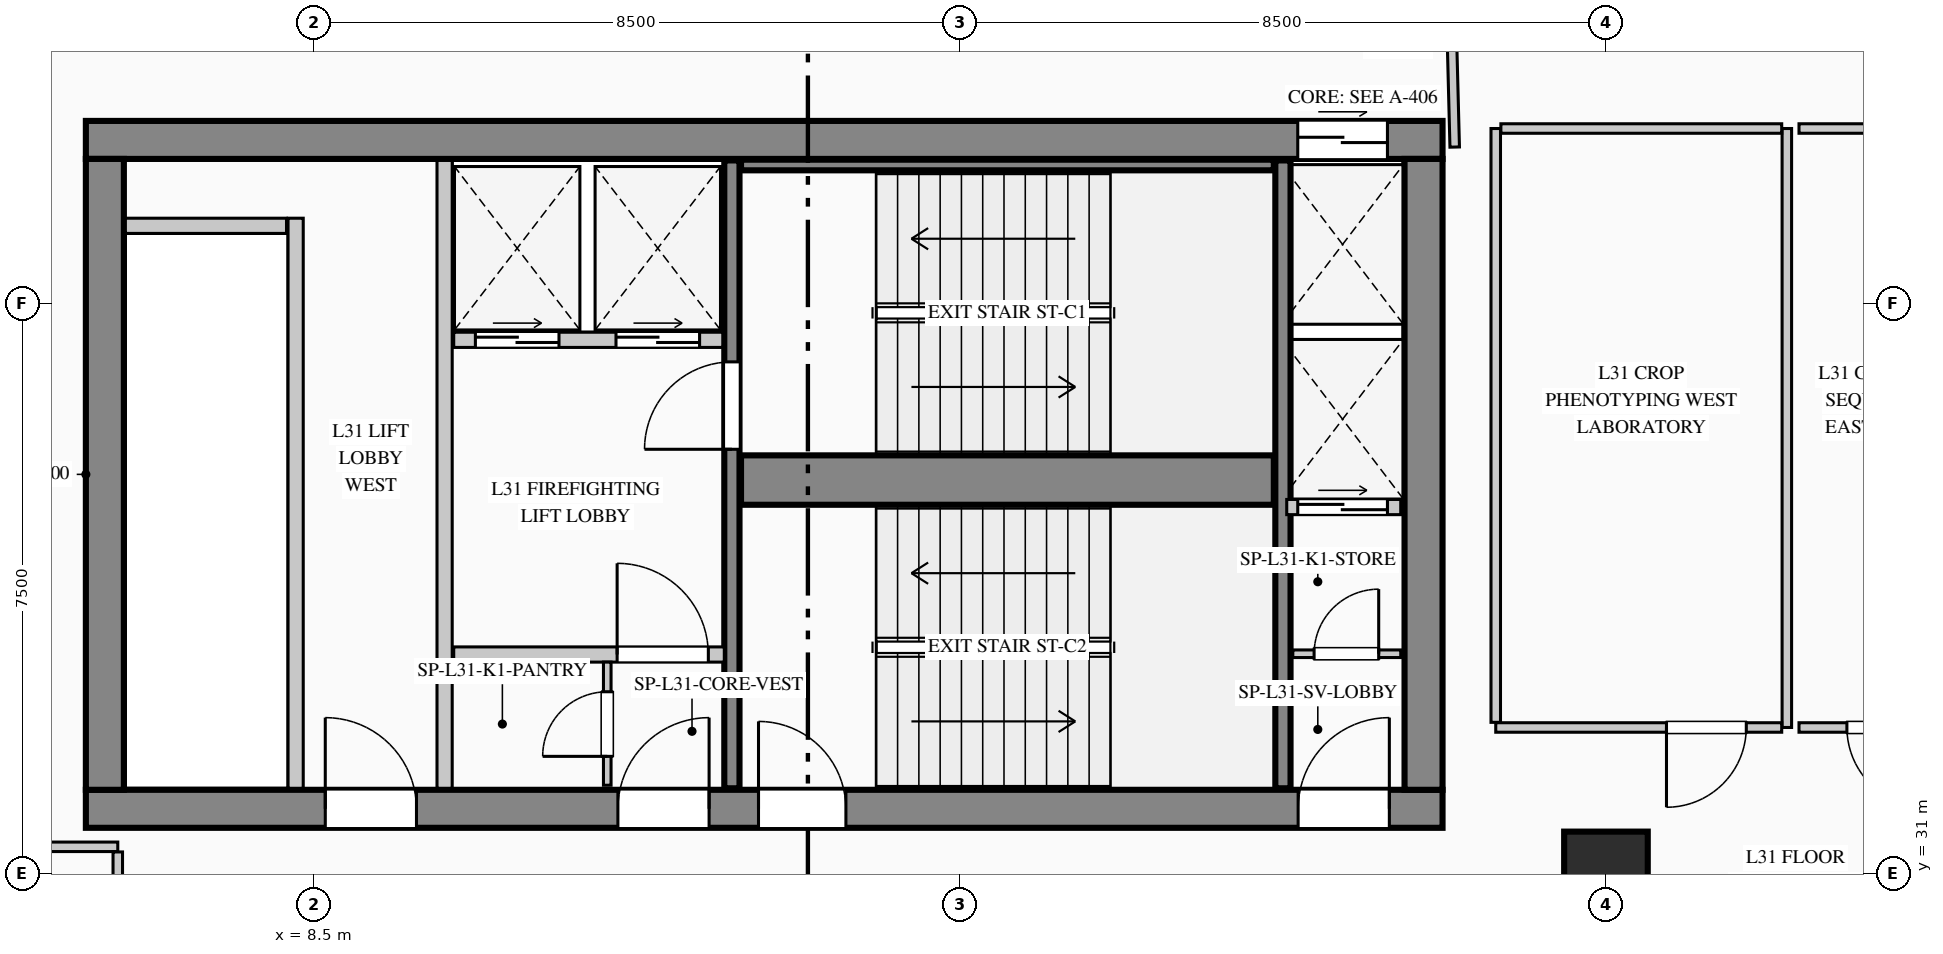
"""IFC4 building model, lengths in metres.
Left out: names, types, materials, properties, quantities, classifications, styles, units other than length and angle.
Written with IfcOpenShell. Run it as: python <this file> out.ifc"""

import sys

from ifc_helpers import new_model, si_unit, direction, frame, frame_2d, origin, origin_2d, place, context, subcontext, project, spatial, rectangle, extrude, element, fill, save


model = new_model("IFC4")
c1 = context("Model", 3, precision=1e-05, world=origin(), true_north=direction((0.0, 1.0)))
c2 = subcontext(c1, "Body", "Model", "MODEL_VIEW")
j1 = project(units=[si_unit("LENGTHUNIT", "METRE"), si_unit("PLANEANGLEUNIT", "RADIAN")], contexts=[c1])
p1 = place(None, origin())
s1 = spatial("IfcSite", under=j1, at=p1, CompositionType="ELEMENT")
p2 = place(p1, origin())
s2 = spatial("IfcBuilding", under=s1, at=p2, CompositionType="ELEMENT")
p3 = place(p2, frame((0.0, 0.0, 135.1)))
s3 = spatial("IfcBuildingStorey", under=s2, at=p3, CompositionType="ELEMENT", Elevation=135.1)
p4 = place(p3, frame((5.5, 40.65, 0.0), z_axis=(0.0, 0.0, 1.0), x_axis=(1.0, 0.0, 0.0)))
e1 = element("IfcWall", 1, at=p4, inside=s3, PredefinedType="SHEAR", context=c2, shape_type="SweptSolid", body=[
    extrude(rectangle(XDim=17.85, YDim=0.5, at=frame_2d((8.925, 0.0))), origin(), (0.0, 0.0, 1.0), 3.95),
])
p5 = place(p4, frame((15.945, 0.0, 0.0)))
e2 = element("IfcOpeningElement", 2, at=p5, cuts=e1, PredefinedType="OPENING", context=c2, shape_type="SweptSolid", body=[
    extrude(rectangle(XDim=1.18, YDim=2.25, at=frame_2d((0.59, 1.125))), frame((0.0, 0.26, 0.0), z_axis=(0.0, -1.0, 0.0), x_axis=(1.0, 0.0, 0.0)), (0.0, 0.0, 1.0), 0.52),
])
p6 = place(p3, frame((5.5, 31.85, 0.0), z_axis=(0.0, 0.0, 1.0), x_axis=(1.0, 0.0, 0.0)))
e3 = element("IfcWall", 3, at=p6, inside=s3, PredefinedType="SHEAR", context=c2, shape_type="SweptSolid", body=[
    extrude(rectangle(XDim=17.85, YDim=0.5, at=frame_2d((8.925, 0.0))), origin(), (0.0, 0.0, 1.0), 3.95),
])
p7 = place(p6, frame((3.15, 0.0, 0.0)))
e4 = element("IfcOpeningElement", 4, at=p7, cuts=e3, PredefinedType="OPENING", context=c2, shape_type="SweptSolid", body=[
    extrude(rectangle(XDim=1.2, YDim=2.2, at=frame_2d((0.6, 1.1))), frame((0.0, 0.26, 0.0), z_axis=(0.0, -1.0, 0.0), x_axis=(1.0, 0.0, 0.0)), (0.0, 0.0, 1.0), 0.52),
])
p8 = place(p6, frame((7.0, 0.0, 0.0)))
e5 = element("IfcOpeningElement", 5, at=p8, cuts=e3, PredefinedType="OPENING", context=c2, shape_type="SweptSolid", body=[
    extrude(rectangle(XDim=1.2, YDim=2.2, at=frame_2d((0.6, 1.1))), frame((0.0, 0.26, 0.0), z_axis=(0.0, -1.0, 0.0), x_axis=(1.0, 0.0, 0.0)), (0.0, 0.0, 1.0), 0.52),
])
p9 = place(p6, frame((8.85, 0.0, 0.0)))
e6 = element("IfcOpeningElement", 6, at=p9, cuts=e3, PredefinedType="OPENING", context=c2, shape_type="SweptSolid", body=[
    extrude(rectangle(XDim=1.15, YDim=2.2, at=frame_2d((0.575, 1.1))), frame((0.0, 0.26, 0.0), z_axis=(0.0, -1.0, 0.0), x_axis=(1.0, 0.0, 0.0)), (0.0, 0.0, 1.0), 0.52),
])
p10 = place(p6, frame((15.95, 0.0, 0.0)))
e7 = element("IfcOpeningElement", 7, at=p10, cuts=e3, PredefinedType="OPENING", context=c2, shape_type="SweptSolid", body=[
    extrude(rectangle(XDim=1.2, YDim=2.2, at=frame_2d((0.6, 1.1))), frame((0.0, 0.26, 0.0), z_axis=(0.0, -1.0, 0.0), x_axis=(1.0, 0.0, 0.0)), (0.0, 0.0, 1.0), 0.52),
])
for number, where, z_axis, x_axis in (
    (8, (5.75, 32.1, 0.0), (0.0, 0.0, 1.0), (0.0, 1.0, 0.0)),
    (9, (23.1, 32.1, 0.0), (0.0, 0.0, 1.0), (0.0, 1.0, 0.0)),
):
    element("IfcWall", number, at=place(p3, frame(where, z_axis=z_axis, x_axis=x_axis)), inside=s3, PredefinedType="SHEAR", context=c2, shape_type="SweptSolid", body=[
        extrude(rectangle(XDim=8.3, YDim=0.5, at=frame_2d((4.15, 0.0))), origin(), (0.0, 0.0, 1.0), 3.95),
    ])
p11 = place(p3, frame((14.0, 32.12, 0.0), z_axis=(0.0, 0.0, 1.0), x_axis=(0.0, 1.0, 0.0)))
e10 = element("IfcWall", 10, at=p11, inside=s3, PredefinedType="SHEAR", context=c2, shape_type="SweptSolid", body=[
    extrude(rectangle(XDim=8.26, YDim=0.2, at=frame_2d((4.13, 0.0))), origin(), (0.0, 0.0, 1.0), 3.95),
])
p12 = place(p11, frame((4.46, 0.0, 0.0)))
e11 = element("IfcOpeningElement", 11, at=p12, cuts=e10, PredefinedType="OPENING", context=c2, shape_type="SweptSolid", body=[
    extrude(rectangle(XDim=1.15, YDim=2.2, at=frame_2d((0.575, 1.1))), frame((0.0, 0.11, 0.0), z_axis=(0.0, -1.0, 0.0), x_axis=(1.0, 0.0, 0.0)), (0.0, 0.0, 1.0), 0.22),
])
p13 = place(p3, frame((14.12, 36.175, 0.0), z_axis=(0.0, 0.0, 1.0), x_axis=(1.0, 0.0, 0.0)))
e12 = element("IfcWall", 12, at=p13, inside=s3, PredefinedType="SHEAR", context=c2, shape_type="SweptSolid", body=[
    extrude(rectangle(XDim=7.01, YDim=0.65, at=frame_2d((3.505, 0.0))), origin(), (0.0, 0.0, 1.0), 3.95),
])
p14 = place(p3, frame((21.25, 32.12, 0.0), z_axis=(0.0, 0.0, 1.0), x_axis=(0.0, 1.0, 0.0)))
e13 = element("IfcWall", 13, at=p14, inside=s3, PredefinedType="SHEAR", context=c2, shape_type="SweptSolid", body=[
    extrude(rectangle(XDim=8.26, YDim=0.2, at=frame_2d((4.13, 0.0))), origin(), (0.0, 0.0, 1.0), 3.95),
])
p15 = place(p3, frame((14.12, 40.32, 0.0), z_axis=(0.0, 0.0, 1.0), x_axis=(1.0, 0.0, 0.0)))
e14 = element("IfcWall", 14, at=p15, inside=s3, PredefinedType="SHEAR", context=c2, shape_type="SweptSolid", body=[
    extrude(rectangle(XDim=7.01, YDim=0.14, at=frame_2d((3.505, 0.0))), origin(), (0.0, 0.0, 1.0), 3.95),
])
p16 = place(p3, frame((25.5, 31.0, 0.0), z_axis=(0.0, 0.0, 1.0), x_axis=(1.0, 0.0, 0.0)))
e15 = element("IfcColumn", 15, at=p16, inside=s3, PredefinedType="COLUMN", context=c2, shape_type="SweptSolid", body=[
    extrude(rectangle(XDim=1.1, YDim=1.1, at=origin_2d()), origin(), (0.0, 0.0, 1.0), 3.95),
])
p17 = place(p3, frame((7.993, 4.73, 0.0), z_axis=(0.0, 0.0, 1.0), x_axis=(-0.136989009016, 0.990572567462, 0.0)))
e16 = element("IfcWall", 16, at=p17, inside=s3, PredefinedType="STANDARD", context=c2, shape_type="SweptSolid", body=[
    extrude(rectangle(XDim=36.888, YDim=0.26, at=frame_2d((18.444, 0.0))), origin(), (0.0, 0.0, 1.0), 3.69),
])
p18 = place(p17, frame((20.848, 0.0, 0.9)))
e17 = element("IfcOpeningElement", 17, at=p18, cuts=e16, PredefinedType="OPENING", context=c2, shape_type="SweptSolid", body=[
    extrude(rectangle(XDim=2.1, YDim=2.0, at=frame_2d((1.05, 1.0))), frame((0.0, 0.14, 0.0), z_axis=(0.0, -1.0, 0.0), x_axis=(1.0, 0.0, 0.0)), (0.0, 0.0, 1.0), 0.28),
])
p19 = place(p3, frame((8.26, 32.12, 0.0), z_axis=(0.0, 0.0, 1.0), x_axis=(0.0, 1.0, 0.0)))
e18 = element("IfcWall", 18, at=p19, inside=s3, PredefinedType="PARTITIONING", context=c2, shape_type="SweptSolid", body=[
    extrude(rectangle(XDim=7.5, YDim=0.2, at=frame_2d((3.75, 0.0))), origin(), (0.0, 0.0, 1.0), 3.69),
])
p20 = place(p3, frame((6.02, 39.52, 0.0), z_axis=(0.0, 0.0, 1.0), x_axis=(1.0, 0.0, 0.0)))
e19 = element("IfcWall", 19, at=p20, inside=s3, PredefinedType="PARTITIONING", context=c2, shape_type="SweptSolid", body=[
    extrude(rectangle(XDim=2.12, YDim=0.2, at=frame_2d((1.06, 0.0))), origin(), (0.0, 0.0, 1.0), 3.69),
])
p21 = place(p3, frame((10.22, 32.12, 0.0), z_axis=(0.0, 0.0, 1.0), x_axis=(0.0, 1.0, 0.0)))
e20 = element("IfcWall", 20, at=p21, inside=s3, PredefinedType="PARTITIONING", context=c2, shape_type="SweptSolid", body=[
    extrude(rectangle(XDim=8.26, YDim=0.2, at=frame_2d((4.13, 0.0))), origin(), (0.0, 0.0, 1.0), 3.69),
])
p22 = place(p3, frame((10.34, 38.02, 0.0), z_axis=(0.0, 0.0, 1.0), x_axis=(1.0, 0.0, 0.0)))
e21 = element("IfcWall", 21, at=p22, inside=s3, PredefinedType="PARTITIONING", context=c2, shape_type="SweptSolid", body=[
    extrude(rectangle(XDim=3.54, YDim=0.2, at=frame_2d((1.77, 0.0))), origin(), (0.0, 0.0, 1.0), 3.69),
])
p23 = place(p22, frame((0.285, 0.0, 0.0)))
e22 = element("IfcOpeningElement", 22, at=p23, cuts=e21, PredefinedType="OPENING", context=c2, shape_type="SweptSolid", body=[
    extrude(rectangle(XDim=1.1, YDim=2.2, at=frame_2d((0.55, 1.1))), frame((0.0, 0.11, 0.0), z_axis=(0.0, -1.0, 0.0), x_axis=(1.0, 0.0, 0.0)), (0.0, 0.0, 1.0), 0.22),
])
p24 = place(p22, frame((2.135, 0.0, 0.0)))
e23 = element("IfcOpeningElement", 23, at=p24, cuts=e21, PredefinedType="OPENING", context=c2, shape_type="SweptSolid", body=[
    extrude(rectangle(XDim=1.1, YDim=2.2, at=frame_2d((0.55, 1.1))), frame((0.0, 0.11, 0.0), z_axis=(0.0, -1.0, 0.0), x_axis=(1.0, 0.0, 0.0)), (0.0, 0.0, 1.0), 0.22),
])
p25 = place(p3, frame((10.34, 33.88, 0.0), z_axis=(0.0, 0.0, 1.0), x_axis=(1.0, 0.0, 0.0)))
e24 = element("IfcWall", 24, at=p25, inside=s3, PredefinedType="PARTITIONING", context=c2, shape_type="SweptSolid", body=[
    extrude(rectangle(XDim=3.56, YDim=0.2, at=frame_2d((1.78, 0.0))), origin(), (0.0, 0.0, 1.0), 3.69),
])
p26 = place(p25, frame((2.15, 0.0, 0.0)))
e25 = element("IfcOpeningElement", 25, at=p26, cuts=e24, PredefinedType="OPENING", context=c2, shape_type="SweptSolid", body=[
    extrude(rectangle(XDim=1.2, YDim=2.2, at=frame_2d((0.6, 1.1))), frame((0.0, 0.11, 0.0), z_axis=(0.0, -1.0, 0.0), x_axis=(1.0, 0.0, 0.0)), (0.0, 0.0, 1.0), 0.22),
])
p27 = place(p3, frame((12.36, 32.16, 0.0), z_axis=(0.0, 0.0, 1.0), x_axis=(0.0, 1.0, 0.0)))
e26 = element("IfcWall", 26, at=p27, inside=s3, PredefinedType="PARTITIONING", context=c2, shape_type="SweptSolid", body=[
    extrude(rectangle(XDim=1.62, YDim=0.1, at=frame_2d((0.81, 0.0))), origin(), (0.0, 0.0, 1.0), 3.69),
])
p28 = place(p27, frame((0.38, 0.0, 0.0)))
e27 = element("IfcOpeningElement", 27, at=p28, cuts=e26, PredefinedType="OPENING", context=c2, shape_type="SweptSolid", body=[
    extrude(rectangle(XDim=0.85, YDim=2.1, at=frame_2d((0.425, 1.05))), frame((0.0, 0.06, 0.0), z_axis=(0.0, -1.0, 0.0), x_axis=(1.0, 0.0, 0.0)), (0.0, 0.0, 1.0), 0.12),
])
p29 = place(p3, frame((21.38, 33.89, 0.0), z_axis=(0.0, 0.0, 1.0), x_axis=(1.0, 0.0, 0.0)))
e28 = element("IfcWall", 28, at=p29, inside=s3, PredefinedType="PARTITIONING", context=c2, shape_type="SweptSolid", body=[
    extrude(rectangle(XDim=1.42, YDim=0.1, at=frame_2d((0.71, 0.0))), origin(), (0.0, 0.0, 1.0), 3.69),
])
p30 = place(p29, frame((0.28, 0.0, 0.0)))
e29 = element("IfcOpeningElement", 29, at=p30, cuts=e28, PredefinedType="OPENING", context=c2, shape_type="SweptSolid", body=[
    extrude(rectangle(XDim=0.85, YDim=2.1, at=frame_2d((0.425, 1.05))), frame((0.0, 0.06, 0.0), z_axis=(0.0, -1.0, 0.0), x_axis=(1.0, 0.0, 0.0)), (0.0, 0.0, 1.0), 0.12),
])
p31 = place(p3, frame((21.3, 35.82, 0.0), z_axis=(0.0, 0.0, 1.0), x_axis=(1.0, 0.0, 0.0)))
e30 = element("IfcWall", 30, at=p31, inside=s3, PredefinedType="PARTITIONING", context=c2, shape_type="SweptSolid", body=[
    extrude(rectangle(XDim=1.5, YDim=0.2, at=frame_2d((0.75, 0.0))), origin(), (0.0, 0.0, 1.0), 3.69),
])
p32 = place(p31, frame((0.145, 0.0, 0.0)))
e31 = element("IfcOpeningElement", 31, at=p32, cuts=e30, PredefinedType="OPENING", context=c2, shape_type="SweptSolid", body=[
    extrude(rectangle(XDim=1.18, YDim=2.25, at=frame_2d((0.59, 1.125))), frame((0.0, 0.11, 0.0), z_axis=(0.0, -1.0, 0.0), x_axis=(1.0, 0.0, 0.0)), (0.0, 0.0, 1.0), 0.22),
])
p33 = place(p3, frame((27.88, 40.8, 0.0), z_axis=(0.0, 0.0, 1.0), x_axis=(0.0, -1.0, 0.0)))
e32 = element("IfcWall", 32, at=p33, inside=s3, PredefinedType="PARTITIONING", context=c2, shape_type="SweptSolid", body=[
    extrude(rectangle(XDim=7.88, YDim=0.125, at=frame_2d((3.94, 0.0))), origin(), (0.0, 0.0, 1.0), 3.69),
])
p34 = place(p3, frame((27.812, 32.92, 0.0), z_axis=(0.0, 0.0, 1.0), x_axis=(-1.0, 0.0, 0.0)))
e33 = element("IfcWall", 33, at=p34, inside=s3, PredefinedType="PARTITIONING", context=c2, shape_type="SweptSolid", body=[
    extrude(rectangle(XDim=3.762, YDim=0.125, at=frame_2d((1.881, 0.0))), origin(), (0.0, 0.0, 1.0), 3.69),
])
p35 = place(p34, frame((0.466, 0.0, 0.0)))
e34 = element("IfcOpeningElement", 34, at=p35, cuts=e33, PredefinedType="OPENING", context=c2, shape_type="SweptSolid", body=[
    extrude(rectangle(XDim=1.05, YDim=2.15, at=frame_2d((0.525, 1.075))), frame((0.0, 0.073, 0.0), z_axis=(0.0, -1.0, 0.0), x_axis=(1.0, 0.0, 0.0)), (0.0, 0.0, 1.0), 0.145),
])
p36 = place(p3, frame((24.05, 32.988, 0.0), z_axis=(0.0, 0.0, 1.0), x_axis=(0.0, 1.0, 0.0)))
e35 = element("IfcWall", 35, at=p36, inside=s3, PredefinedType="PARTITIONING", context=c2, shape_type="SweptSolid", body=[
    extrude(rectangle(XDim=7.812, YDim=0.125, at=frame_2d((3.906, 0.0))), origin(), (0.0, 0.0, 1.0), 3.69),
])
p37 = place(p3, frame((24.117, 40.8, 0.0), z_axis=(0.0, 0.0, 1.0), x_axis=(1.0, 0.0, 0.0)))
e36 = element("IfcWall", 36, at=p37, inside=s3, PredefinedType="PARTITIONING", context=c2, shape_type="SweptSolid", body=[
    extrude(rectangle(XDim=3.695, YDim=0.125, at=frame_2d((1.848, 0.0))), origin(), (0.0, 0.0, 1.0), 3.69),
])
p38 = place(p3, frame((30.35, 32.92, 0.0), z_axis=(0.0, 0.0, 1.0), x_axis=(-1.0, 0.0, 0.0)))
e37 = element("IfcWall", 37, at=p38, inside=s3, PredefinedType="PARTITIONING", context=c2, shape_type="SweptSolid", body=[
    extrude(rectangle(XDim=2.31, YDim=0.125, at=frame_2d((1.155, 0.0))), origin(), (0.0, 0.0, 1.0), 3.69),
])
p39 = place(p38, frame((0.63, 0.0, 0.0)))
e38 = element("IfcOpeningElement", 38, at=p39, cuts=e37, PredefinedType="OPENING", context=c2, shape_type="SweptSolid", body=[
    extrude(rectangle(XDim=1.05, YDim=2.15, at=frame_2d((0.525, 1.075))), frame((0.0, 0.073, 0.0), z_axis=(0.0, -1.0, 0.0), x_axis=(1.0, 0.0, 0.0)), (0.0, 0.0, 1.0), 0.145),
])
p40 = place(p3, frame((28.04, 40.8, 0.0), z_axis=(0.0, 0.0, 1.0), x_axis=(1.0, 0.0, 0.0)))
e39 = element("IfcWall", 39, at=p40, inside=s3, PredefinedType="PARTITIONING", context=c2, shape_type="SweptSolid", body=[
    extrude(rectangle(XDim=2.31, YDim=0.125, at=frame_2d((1.155, 0.0))), origin(), (0.0, 0.0, 1.0), 3.69),
])
p41 = place(p3, frame((4.448, 31.35, 0.0), z_axis=(0.0, 0.0, 1.0), x_axis=(1.0, 0.0, 0.0)))
e40 = element("IfcWall", 40, at=p41, inside=s3, PredefinedType="PARTITIONING", context=c2, shape_type="SweptSolid", body=[
    extrude(rectangle(XDim=1.472, YDim=0.125, at=frame_2d((0.736, 0.0))), origin(), (0.0, 0.0, 1.0), 3.69),
])
p42 = place(p3, frame((5.92, 31.282, 0.0), z_axis=(0.0, 0.0, 1.0), x_axis=(0.0, -1.0, 0.0)))
e41 = element("IfcWall", 41, at=p42, inside=s3, PredefinedType="PARTITIONING", context=c2, shape_type="SweptSolid", body=[
    extrude(rectangle(XDim=2.682, YDim=0.125, at=frame_2d((1.341, 0.0))), origin(), (0.0, 0.0, 1.0), 3.69),
])
p43 = place(p3, frame((23.51, 40.556, 0.0), z_axis=(0.0, 0.0, 1.0), x_axis=(-0.02567646332, 0.999670305266, 0.0)))
e42 = element("IfcWall", 42, at=p43, inside=s3, PredefinedType="PARTITIONING", context=c2, shape_type="SweptSolid", body=[
    extrude(rectangle(XDim=2.71, YDim=0.125, at=frame_2d((1.355, 0.0))), origin(), (0.0, 0.0, 1.0), 3.69),
])
p44 = place(p7, origin())
e43 = element("IfcDoor", 43, at=p44, inside=s3, OperationType="SINGLE_SWING_LEFT", PredefinedType="DOOR", context=c2, shape_type="SweptSolid", body=[
    extrude(rectangle(XDim=1.2, YDim=2.2, at=frame_2d((0.6, 1.1))), frame((0.0, 0.025, 0.0), z_axis=(0.0, -1.0, 0.0), x_axis=(1.0, 0.0, 0.0)), (0.0, 0.0, 1.0), 0.05),
])
fill(e4, e43)
p45 = place(p8, origin())
e44 = element("IfcDoor", 44, at=p45, inside=s3, OperationType="SINGLE_SWING_RIGHT", PredefinedType="DOOR", context=c2, shape_type="SweptSolid", body=[
    extrude(rectangle(XDim=1.2, YDim=2.2, at=frame_2d((0.6, 1.1))), frame((0.0, 0.025, 0.0), z_axis=(0.0, -1.0, 0.0), x_axis=(1.0, 0.0, 0.0)), (0.0, 0.0, 1.0), 0.05),
])
fill(e5, e44)
p46 = place(p9, origin())
e45 = element("IfcDoor", 45, at=p46, inside=s3, OperationType="SINGLE_SWING_LEFT", PredefinedType="DOOR", context=c2, shape_type="SweptSolid", body=[
    extrude(rectangle(XDim=1.15, YDim=2.2, at=frame_2d((0.575, 1.1))), frame((0.0, 0.025, 0.0), z_axis=(0.0, -1.0, 0.0), x_axis=(1.0, 0.0, 0.0)), (0.0, 0.0, 1.0), 0.05),
])
fill(e6, e45)
p47 = place(p10, origin())
e46 = element("IfcDoor", 46, at=p47, inside=s3, OperationType="SINGLE_SWING_RIGHT", PredefinedType="DOOR", context=c2, shape_type="SweptSolid", body=[
    extrude(rectangle(XDim=1.2, YDim=2.2, at=frame_2d((0.6, 1.1))), frame((0.0, 0.025, 0.0), z_axis=(0.0, -1.0, 0.0), x_axis=(1.0, 0.0, 0.0)), (0.0, 0.0, 1.0), 0.05),
])
fill(e7, e46)
p48 = place(p26, origin())
e47 = element("IfcDoor", 47, at=p48, inside=s3, OperationType="SINGLE_SWING_LEFT", PredefinedType="DOOR", context=c2, shape_type="SweptSolid", body=[
    extrude(rectangle(XDim=1.2, YDim=2.2, at=frame_2d((0.6, 1.1))), frame((0.0, 0.025, 0.0), z_axis=(0.0, -1.0, 0.0), x_axis=(1.0, 0.0, 0.0)), (0.0, 0.0, 1.0), 0.05),
])
fill(e25, e47)
p49 = place(p28, origin())
e48 = element("IfcDoor", 48, at=p49, inside=s3, OperationType="SINGLE_SWING_LEFT", PredefinedType="DOOR", context=c2, shape_type="SweptSolid", body=[
    extrude(rectangle(XDim=0.85, YDim=2.1, at=frame_2d((0.425, 1.05))), frame((0.0, 0.025, 0.0), z_axis=(0.0, -1.0, 0.0), x_axis=(1.0, 0.0, 0.0)), (0.0, 0.0, 1.0), 0.05),
])
fill(e27, e48)
p50 = place(p30, origin())
e49 = element("IfcDoor", 49, at=p50, inside=s3, OperationType="SINGLE_SWING_RIGHT", PredefinedType="DOOR", context=c2, shape_type="SweptSolid", body=[
    extrude(rectangle(XDim=0.85, YDim=2.1, at=frame_2d((0.425, 1.05))), frame((0.0, 0.025, 0.0), z_axis=(0.0, -1.0, 0.0), x_axis=(1.0, 0.0, 0.0)), (0.0, 0.0, 1.0), 0.05),
])
fill(e29, e49)
p51 = place(p12, origin())
e50 = element("IfcDoor", 50, at=p51, inside=s3, OperationType="SINGLE_SWING_LEFT", PredefinedType="DOOR", context=c2, shape_type="SweptSolid", body=[
    extrude(rectangle(XDim=1.15, YDim=2.2, at=frame_2d((0.575, 1.1))), frame((0.0, 0.025, 0.0), z_axis=(0.0, -1.0, 0.0), x_axis=(1.0, 0.0, 0.0)), (0.0, 0.0, 1.0), 0.05),
])
fill(e11, e50)
p52 = place(p23, origin())
e51 = element("IfcDoor", 51, at=p52, inside=s3, OperationType="DOUBLE_DOOR_SLIDING", PredefinedType="DOOR", context=c2, shape_type="SweptSolid", body=[
    extrude(rectangle(XDim=1.1, YDim=2.2, at=frame_2d((0.55, 1.1))), frame((0.0, 0.025, 0.0), z_axis=(0.0, -1.0, 0.0), x_axis=(1.0, 0.0, 0.0)), (0.0, 0.0, 1.0), 0.05),
])
fill(e22, e51)
p53 = place(p24, origin())
e52 = element("IfcDoor", 52, at=p53, inside=s3, OperationType="DOUBLE_DOOR_SLIDING", PredefinedType="DOOR", context=c2, shape_type="SweptSolid", body=[
    extrude(rectangle(XDim=1.1, YDim=2.2, at=frame_2d((0.55, 1.1))), frame((0.0, 0.025, 0.0), z_axis=(0.0, -1.0, 0.0), x_axis=(1.0, 0.0, 0.0)), (0.0, 0.0, 1.0), 0.05),
])
fill(e23, e52)
p54 = place(p5, origin())
e53 = element("IfcDoor", 53, at=p54, inside=s3, OperationType="DOUBLE_DOOR_SLIDING", PredefinedType="DOOR", context=c2, shape_type="SweptSolid", body=[
    extrude(rectangle(XDim=1.18, YDim=2.25, at=frame_2d((0.59, 1.125))), frame((0.0, 0.025, 0.0), z_axis=(0.0, -1.0, 0.0), x_axis=(1.0, 0.0, 0.0)), (0.0, 0.0, 1.0), 0.05),
])
fill(e2, e53)
p55 = place(p32, origin())
e54 = element("IfcDoor", 54, at=p55, inside=s3, OperationType="DOUBLE_DOOR_SLIDING", PredefinedType="DOOR", context=c2, shape_type="SweptSolid", body=[
    extrude(rectangle(XDim=1.18, YDim=2.25, at=frame_2d((0.59, 1.125))), frame((0.0, 0.025, 0.0), z_axis=(0.0, -1.0, 0.0), x_axis=(1.0, 0.0, 0.0)), (0.0, 0.0, 1.0), 0.05),
])
fill(e31, e54)
p56 = place(p35, origin())
e55 = element("IfcDoor", 55, at=p56, inside=s3, OperationType="SINGLE_SWING_RIGHT", PredefinedType="DOOR", context=c2, shape_type="SweptSolid", body=[
    extrude(rectangle(XDim=1.05, YDim=2.15, at=frame_2d((0.525, 1.075))), frame((0.0, 0.025, 0.0), z_axis=(0.0, -1.0, 0.0), x_axis=(1.0, 0.0, 0.0)), (0.0, 0.0, 1.0), 0.05),
])
fill(e34, e55)
p57 = place(p39, origin())
e56 = element("IfcDoor", 56, at=p57, inside=s3, OperationType="SINGLE_SWING_LEFT", PredefinedType="DOOR", context=c2, shape_type="SweptSolid", body=[
    extrude(rectangle(XDim=1.05, YDim=2.15, at=frame_2d((0.525, 1.075))), frame((0.0, 0.025, 0.0), z_axis=(0.0, -1.0, 0.0), x_axis=(1.0, 0.0, 0.0)), (0.0, 0.0, 1.0), 0.05),
])
fill(e38, e56)
save(model, sys.argv[1])
